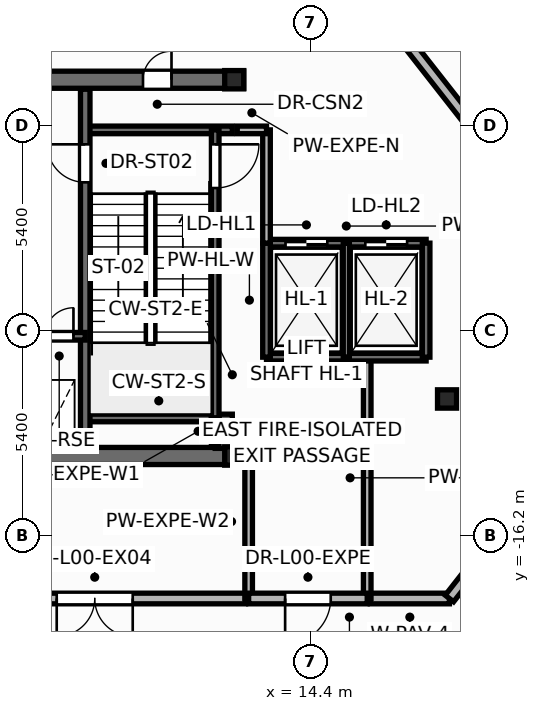
"""IFC4 building model, lengths in metres.
Left out: names, types, materials, properties, quantities, classifications, styles, units other than length and angle.
Written with IfcOpenShell. Run it as: python <this file> out.ifc"""

import sys

from ifc_helpers import new_model, si_unit, direction, frame, frame_2d, origin, origin_2d, place, context, subcontext, project, spatial, rectangle, i_section, extrude, element, fill, save


model = new_model("IFC4")
c1 = context("Model", 3, precision=1e-05, world=origin(), true_north=direction((0.0, 1.0)))
c2 = subcontext(c1, "Body", "Model", "MODEL_VIEW")
j1 = project(units=[si_unit("LENGTHUNIT", "METRE"), si_unit("PLANEANGLEUNIT", "RADIAN")], contexts=[c1])
p1 = place(None, origin())
s1 = spatial("IfcSite", under=j1, at=p1, CompositionType="ELEMENT")
p2 = place(p1, origin())
s2 = spatial("IfcBuilding", under=s1, at=p2, CompositionType="ELEMENT")
p3 = place(p2, origin())
s3 = spatial("IfcBuildingStorey", under=s2, at=p3, CompositionType="ELEMENT", Elevation=0.0)
for number, where, z_axis, x_axis in (
    (1, (12.4, -14.1, 0.0), (0.0, 0.0, 1.0), (1.0, 0.0, 0.0)),
    (2, (12.4, -4.2, 0.0), (0.0, 0.0, 1.0), (1.0, 0.0, 0.0)),
    (3, (18.0, -12.6, 0.0), (0.0, 0.0, 1.0), (1.0, 0.0, 0.0)),
):
    element("IfcColumn", number, at=place(p3, frame(where, z_axis=z_axis, x_axis=x_axis)), inside=s3, PredefinedType="COLUMN", context=c2, shape_type="SweptSolid", body=[
        extrude(i_section(OverallWidth=0.5, OverallDepth=0.482, WebThickness=0.04, FlangeThickness=0.045, at=origin_2d()), origin(), (0.0, 0.0, 1.0), 5.4),
    ])
p4 = place(p3, frame((12.7, -17.85, -0.015), z_axis=(0.0, 0.0, 1.0), x_axis=(-1.0, 0.0, 0.0)))
e4 = element("IfcWall", 4, at=p4, inside=s3, PredefinedType="STANDARD", context=c2, shape_type="SweptSolid", body=[
    extrude(rectangle(XDim=25.4, YDim=0.28, at=frame_2d((12.7, 0.0))), origin(), (0.0, 0.0, 1.0), 4.498),
])
p5 = place(p4, frame((2.97, 0.0, 0.015)))
e5 = element("IfcOpeningElement", 5, at=p5, cuts=e4, PredefinedType="OPENING", context=c2, shape_type="SweptSolid", body=[
    extrude(rectangle(XDim=2.006, YDim=2.304, at=frame_2d((1.0, 1.152))), frame((0.0, 0.15, 0.0), z_axis=(0.0, -1.0, 0.0), x_axis=(1.0, 0.0, 0.0)), (0.0, 0.0, 1.0), 0.3),
])
p6 = place(p3, frame((18.063, -17.85, -0.015), z_axis=(0.0, 0.0, 1.0), x_axis=(-1.0, 0.0, 0.0)))
e6 = element("IfcWall", 6, at=p6, inside=s3, PredefinedType="STANDARD", context=c2, shape_type="SweptSolid", body=[
    extrude(rectangle(XDim=2.083, YDim=0.28, at=frame_2d((1.042, 0.0))), origin(), (0.0, 0.0, 1.0), 5.135),
])
p7 = place(p3, frame((23.245, -11.24, -0.015), z_axis=(0.0, 0.0, 1.0), x_axis=(-0.616936653938, -0.787012811222, 0.0)))
e7 = element("IfcWall", 7, at=p7, inside=s3, PredefinedType="STANDARD", context=c2, shape_type="SweptSolid", body=[
    extrude(rectangle(XDim=8.399, YDim=0.28, at=frame_2d((4.199, 0.0))), origin(), (0.0, 0.0, 1.0), 5.135),
])
p8 = place(p7, frame((0.22, 0.0, 0.015)))
e8 = element("IfcOpeningElement", 8, at=p8, cuts=e7, PredefinedType="OPENING", context=c2, shape_type="SweptSolid", body=[
    extrude(rectangle(XDim=1.206, YDim=2.154, at=frame_2d((0.6, 1.077))), frame((0.0, 0.15, 0.0), z_axis=(0.0, -1.0, 0.0), x_axis=(1.0, 0.0, 0.0)), (0.0, 0.0, 1.0), 0.3),
])
p9 = place(p3, frame((5.583, 11.29, -0.015), z_axis=(0.0, 0.0, 1.0), x_axis=(0.616945483616, -0.787005889588, 0.0)))
e9 = element("IfcWall", 9, at=p9, inside=s3, PredefinedType="STANDARD", context=c2, shape_type="SweptSolid", body=[
    extrude(rectangle(XDim=28.627, YDim=0.28, at=frame_2d((14.314, 0.0))), origin(), (0.0, 0.0, 1.0), 3.91),
])
p10 = place(p9, frame((2.979, 0.0, 0.015)))
e10 = element("IfcOpeningElement", 10, at=p10, cuts=e9, PredefinedType="OPENING", context=c2, shape_type="SweptSolid", body=[
    extrude(rectangle(XDim=1.206, YDim=2.154, at=frame_2d((0.6, 1.077))), frame((0.0, 0.15, 0.0), z_axis=(0.0, -1.0, 0.0), x_axis=(1.0, 0.0, 0.0)), (0.0, 0.0, 1.0), 0.3),
])
p11 = place(p3, frame((-12.75, -14.1, 0.0), z_axis=(0.0, 0.0, 1.0), x_axis=(1.0, 0.0, 0.0)))
e11 = element("IfcWall", 11, at=p11, inside=s3, PredefinedType="SHEAR", context=c2, shape_type="SweptSolid", body=[
    extrude(rectangle(XDim=25.5, YDim=0.45, at=frame_2d((12.75, 0.0))), origin(), (0.0, 0.0, 1.0), 5.4),
])
p12 = place(p3, frame((-12.65, -4.2, 0.0), z_axis=(0.0, 0.0, 1.0), x_axis=(1.0, 0.0, 0.0)))
e12 = element("IfcWall", 12, at=p12, inside=s3, PredefinedType="SHEAR", context=c2, shape_type="SweptSolid", body=[
    extrude(rectangle(XDim=25.3, YDim=0.45, at=frame_2d((12.65, 0.0))), origin(), (0.0, 0.0, 1.0), 5.4),
])
p13 = place(p12, frame((1.85, 0.0, 0.0)))
e13 = element("IfcOpeningElement", 13, at=p13, cuts=e12, PredefinedType="OPENING", context=c2, shape_type="SweptSolid", body=[
    extrude(rectangle(XDim=0.756, YDim=2.054, at=frame_2d((0.375, 1.027))), frame((0.0, 0.235, 0.0), z_axis=(0.0, -1.0, 0.0), x_axis=(1.0, 0.0, 0.0)), (0.0, 0.0, 1.0), 0.47),
])
p14 = place(p12, frame((22.65, 0.0, 0.0)))
e14 = element("IfcOpeningElement", 14, at=p14, cuts=e12, PredefinedType="OPENING", context=c2, shape_type="SweptSolid", body=[
    extrude(rectangle(XDim=0.756, YDim=2.054, at=frame_2d((0.375, 1.027))), frame((0.0, 0.235, 0.0), z_axis=(0.0, -1.0, 0.0), x_axis=(1.0, 0.0, 0.0)), (0.0, 0.0, 1.0), 0.47),
])
p15 = place(p12, frame((5.85, 0.0, 0.0)))
e15 = element("IfcOpeningElement", 15, at=p15, cuts=e12, PredefinedType="OPENING", context=c2, shape_type="SweptSolid", body=[
    extrude(rectangle(XDim=1.006, YDim=2.104, at=frame_2d((0.5, 1.052))), frame((0.0, 0.235, 0.0), z_axis=(0.0, -1.0, 0.0), x_axis=(1.0, 0.0, 0.0)), (0.0, 0.0, 1.0), 0.47),
])
p16 = place(p12, frame((10.35, 0.0, 0.0)))
e16 = element("IfcOpeningElement", 16, at=p16, cuts=e12, PredefinedType="OPENING", context=c2, shape_type="SweptSolid", body=[
    extrude(rectangle(XDim=1.406, YDim=2.154, at=frame_2d((0.7, 1.077))), frame((0.0, 0.235, 0.0), z_axis=(0.0, -1.0, 0.0), x_axis=(1.0, 0.0, 0.0)), (0.0, 0.0, 1.0), 0.47),
])
p17 = place(p12, frame((18.45, 0.0, 0.0)))
e17 = element("IfcOpeningElement", 17, at=p17, cuts=e12, PredefinedType="OPENING", context=c2, shape_type="SweptSolid", body=[
    extrude(rectangle(XDim=1.006, YDim=2.104, at=frame_2d((0.5, 1.052))), frame((0.0, 0.235, 0.0), z_axis=(0.0, -1.0, 0.0), x_axis=(1.0, 0.0, 0.0)), (0.0, 0.0, 1.0), 0.47),
])
for number, where, z_axis, x_axis in (
    (18, (8.48, -5.52, 0.0), (0.0, 0.0, 1.0), (1.0, 0.0, 0.0)),
    (19, (8.48, -13.1, 0.0), (0.0, 0.0, 1.0), (1.0, 0.0, 0.0)),
):
    element("IfcWall", number, at=place(p3, frame(where, z_axis=z_axis, x_axis=x_axis)), inside=s3, PredefinedType="SOLIDWALL", context=c2, shape_type="SweptSolid", body=[
        extrude(rectangle(XDim=3.87, YDim=0.2, at=frame_2d((1.935, 0.0))), origin(), (0.0, 0.0, 1.0), 5.4),
    ])
p18 = place(p3, frame((11.9, -5.52, 0.0), z_axis=(0.0, 0.0, 1.0), x_axis=(0.0, -1.0, 0.0)))
e20 = element("IfcWall", 20, at=p18, inside=s3, PredefinedType="SOLIDWALL", context=c2, shape_type="SweptSolid", body=[
    extrude(rectangle(XDim=7.58, YDim=0.2, at=frame_2d((3.79, 0.0))), origin(), (0.0, 0.0, 1.0), 5.4),
])
p19 = place(p18, frame((0.38, 0.0, 0.0)))
e21 = element("IfcOpeningElement", 21, at=p19, cuts=e20, PredefinedType="OPENING", context=c2, shape_type="SweptSolid", body=[
    extrude(rectangle(XDim=1.156, YDim=2.154, at=frame_2d((0.575, 1.077))), frame((0.0, 0.11, 0.0), z_axis=(0.0, -1.0, 0.0), x_axis=(1.0, 0.0, 0.0)), (0.0, 0.0, 1.0), 0.22),
])
p20 = place(p3, frame((8.48, -13.85, 0.0), z_axis=(0.0, 0.0, 1.0), x_axis=(0.0, 1.0, 0.0)))
e22 = element("IfcWall", 22, at=p20, inside=s3, PredefinedType="SHEAR", context=c2, shape_type="SweptSolid", body=[
    extrude(rectangle(XDim=9.4, YDim=0.25, at=frame_2d((4.7, 0.0))), origin(), (0.0, 0.0, 1.0), 5.4),
])
p21 = place(p20, frame((6.95, 0.0, 0.0)))
e23 = element("IfcOpeningElement", 23, at=p21, cuts=e22, PredefinedType="OPENING", context=c2, shape_type="SweptSolid", body=[
    extrude(rectangle(XDim=1.006, YDim=2.104, at=frame_2d((0.5, 1.052))), frame((0.0, 0.135, 0.0), z_axis=(0.0, -1.0, 0.0), x_axis=(1.0, 0.0, 0.0)), (0.0, 0.0, 1.0), 0.27),
])
p22 = place(p3, frame((5.12, -10.95, 0.0), z_axis=(0.0, 0.0, 1.0), x_axis=(1.0, 0.0, 0.0)))
e24 = element("IfcWall", 24, at=p22, inside=s3, PredefinedType="SOLIDWALL", context=c2, shape_type="SweptSolid", body=[
    extrude(rectangle(XDim=3.36, YDim=0.2, at=frame_2d((1.68, 0.0))), origin(), (0.0, 0.0, 1.0), 5.4),
])
p23 = place(p22, frame((0.42, 0.0, 0.0)))
e25 = element("IfcOpeningElement", 25, at=p23, cuts=e24, PredefinedType="OPENING", context=c2, shape_type="SweptSolid", body=[
    extrude(rectangle(XDim=1.106, YDim=2.104, at=frame_2d((0.55, 1.052))), frame((0.0, 0.11, 0.0), z_axis=(0.0, -1.0, 0.0), x_axis=(1.0, 0.0, 0.0)), (0.0, 0.0, 1.0), 0.22),
])
p24 = place(p22, frame((2.3, 0.0, 0.0)))
e26 = element("IfcOpeningElement", 26, at=p24, cuts=e24, PredefinedType="OPENING", context=c2, shape_type="SweptSolid", body=[
    extrude(rectangle(XDim=0.756, YDim=2.054, at=frame_2d((0.375, 1.027))), frame((0.0, 0.11, 0.0), z_axis=(0.0, -1.0, 0.0), x_axis=(1.0, 0.0, 0.0)), (0.0, 0.0, 1.0), 0.22),
])
p25 = place(p3, frame((15.9, -17.85, 0.0), z_axis=(0.0, 0.0, 1.0), x_axis=(0.0, 1.0, 0.0)))
e27 = element("IfcWall", 27, at=p25, inside=s3, PredefinedType="SOLIDWALL", context=c2, shape_type="SweptSolid", body=[
    extrude(rectangle(XDim=6.35, YDim=0.2, at=frame_2d((3.175, 0.0))), origin(), (0.0, 0.0, 1.0), 5.12),
])
p26 = place(p3, frame((13.25, -11.5, 0.0), z_axis=(0.0, 0.0, 1.0), x_axis=(1.0, 0.0, 0.0)))
e28 = element("IfcWall", 28, at=p26, inside=s3, PredefinedType="SOLIDWALL", context=c2, shape_type="SweptSolid", body=[
    extrude(rectangle(XDim=4.2, YDim=0.2, at=frame_2d((2.1, 0.0))), origin(), (0.0, 0.0, 1.0), 5.4),
])
p27 = place(p3, frame((13.25, -8.5, 0.0), z_axis=(0.0, 0.0, 1.0), x_axis=(1.0, 0.0, 0.0)))
e29 = element("IfcWall", 29, at=p27, inside=s3, PredefinedType="SOLIDWALL", context=c2, shape_type="SweptSolid", body=[
    extrude(rectangle(XDim=4.2, YDim=0.2, at=frame_2d((2.1, 0.0))), origin(), (0.0, 0.0, 1.0), 5.4),
])
p28 = place(p27, frame((0.5, 0.0, 0.0)))
e30 = element("IfcOpeningElement", 30, at=p28, cuts=e29, PredefinedType="OPENING", context=c2, shape_type="SweptSolid", body=[
    extrude(rectangle(XDim=1.106, YDim=2.104, at=frame_2d((0.55, 1.052))), frame((0.0, 0.11, 0.0), z_axis=(0.0, -1.0, 0.0), x_axis=(1.0, 0.0, 0.0)), (0.0, 0.0, 1.0), 0.22),
])
p29 = place(p27, frame((2.6, 0.0, 0.0)))
e31 = element("IfcOpeningElement", 31, at=p29, cuts=e29, PredefinedType="OPENING", context=c2, shape_type="SweptSolid", body=[
    extrude(rectangle(XDim=1.106, YDim=2.104, at=frame_2d((0.55, 1.052))), frame((0.0, 0.11, 0.0), z_axis=(0.0, -1.0, 0.0), x_axis=(1.0, 0.0, 0.0)), (0.0, 0.0, 1.0), 0.22),
])
p30 = place(p3, frame((12.78, -17.85, 0.0), z_axis=(0.0, 0.0, 1.0), x_axis=(0.0, 1.0, 0.0)))
e32 = element("IfcWall", 32, at=p30, inside=s3, PredefinedType="SOLIDWALL", context=c2, shape_type="SweptSolid", body=[
    extrude(rectangle(XDim=4.05, YDim=0.2, at=frame_2d((2.025, 0.0))), origin(), (0.0, 0.0, 1.0), 5.12),
])
p31 = place(p3, frame((15.9, -17.85, 0.0), z_axis=(0.0, 0.0, 1.0), x_axis=(-1.0, 0.0, 0.0)))
e33 = element("IfcWall", 33, at=p31, inside=s3, PredefinedType="STANDARD", context=c2, shape_type="SweptSolid", body=[
    extrude(rectangle(XDim=3.12, YDim=0.28, at=frame_2d((1.56, 0.0))), origin(), (0.0, 0.0, 1.0), 5.12),
])
p32 = place(p31, frame((0.96, 0.0, 0.0)))
e34 = element("IfcOpeningElement", 34, at=p32, cuts=e33, PredefinedType="OPENING", context=c2, shape_type="SweptSolid", body=[
    extrude(rectangle(XDim=1.206, YDim=2.154, at=frame_2d((0.6, 1.077))), frame((0.0, 0.15, 0.0), z_axis=(0.0, -1.0, 0.0), x_axis=(1.0, 0.0, 0.0)), (0.0, 0.0, 1.0), 0.3),
])
for number, where, z_axis, x_axis in (
    (35, (13.25, -11.5, 0.0), (0.0, 0.0, 1.0), (0.0, 1.0, 0.0)),
    (36, (17.45, -11.5, 0.0), (0.0, 0.0, 1.0), (0.0, 1.0, 0.0)),
):
    element("IfcWall", number, at=place(p3, frame(where, z_axis=z_axis, x_axis=x_axis)), inside=s3, PredefinedType="SOLIDWALL", context=c2, shape_type="SweptSolid", body=[
        extrude(rectangle(XDim=3.0, YDim=0.2, at=frame_2d((1.5, 0.0))), origin(), (0.0, 0.0, 1.0), 5.4),
    ])
p33 = place(p3, frame((15.35, -11.5, 0.0), z_axis=(0.0, 0.0, 1.0), x_axis=(0.0, 1.0, 0.0)))
e37 = element("IfcWall", 37, at=p33, inside=s3, PredefinedType="PARTITIONING", context=c2, shape_type="SweptSolid", body=[
    extrude(rectangle(XDim=3.0, YDim=0.16, at=frame_2d((1.5, 0.0))), origin(), (0.0, 0.0, 1.0), 5.12),
])
p34 = place(p3, frame((13.25, -8.5, 0.0), z_axis=(0.0, 0.0, 1.0), x_axis=(0.0, 1.0, 0.0)))
e38 = element("IfcWall", 38, at=p34, inside=s3, PredefinedType="SOLIDWALL", context=c2, shape_type="SweptSolid", body=[
    extrude(rectangle(XDim=2.98, YDim=0.2, at=frame_2d((1.49, 0.0))), origin(), (0.0, 0.0, 1.0), 5.12),
])
p35 = place(p3, frame((11.9, -13.8, 0.0), z_axis=(0.0, 0.0, 1.0), x_axis=(1.0, 0.0, 0.0)))
e39 = element("IfcWall", 39, at=p35, inside=s3, PredefinedType="SOLIDWALL", context=c2, shape_type="SweptSolid", body=[
    extrude(rectangle(XDim=0.88, YDim=0.2, at=frame_2d((0.44, 0.0))), origin(), (0.0, 0.0, 1.0), 4.483),
])
p36 = place(p3, frame((12.48, -5.52, 0.0), z_axis=(0.0, 0.0, 1.0), x_axis=(1.0, 0.0, 0.0)))
e40 = element("IfcWall", 40, at=p36, inside=s3, PredefinedType="SOLIDWALL", context=c2, shape_type="SweptSolid", body=[
    extrude(rectangle(XDim=0.77, YDim=0.2, at=frame_2d((0.385, 0.0))), origin(), (0.0, 0.0, 1.0), 4.483),
])
p37 = place(p3, frame((11.9, -13.8, 0.0), z_axis=(0.0, 0.0, 1.0), x_axis=(0.0, 1.0, 0.0)))
e41 = element("IfcWall", 41, at=p37, inside=s3, PredefinedType="SOLIDWALL", context=c2, shape_type="SweptSolid", body=[
    extrude(rectangle(XDim=0.7, YDim=0.2, at=frame_2d((0.35, 0.0))), origin(), (0.0, 0.0, 1.0), 5.12),
])
p38 = place(p5, origin())
e42 = element("IfcDoor", 42, at=p38, inside=s3, OperationType="DOUBLE_DOOR_SINGLE_SWING", PredefinedType="DOOR", context=c2, shape_type="SweptSolid", body=[
    extrude(rectangle(XDim=2.0, YDim=2.3, at=frame_2d((1.0, 1.15))), frame((0.0, 0.025, 0.0), z_axis=(0.0, -1.0, 0.0), x_axis=(1.0, 0.0, 0.0)), (0.0, 0.0, 1.0), 0.05),
])
fill(e5, e42)
p39 = place(p21, origin())
e43 = element("IfcDoor", 43, at=p39, inside=s3, OperationType="SINGLE_SWING_RIGHT", PredefinedType="DOOR", context=c2, shape_type="SweptSolid", body=[
    extrude(rectangle(XDim=1.0, YDim=2.1, at=frame_2d((0.5, 1.05))), frame((0.0, 0.025, 0.0), z_axis=(0.0, -1.0, 0.0), x_axis=(1.0, 0.0, 0.0)), (0.0, 0.0, 1.0), 0.05),
])
fill(e23, e43)
p40 = place(p19, origin())
e44 = element("IfcDoor", 44, at=p40, inside=s3, OperationType="SINGLE_SWING_LEFT", PredefinedType="DOOR", context=c2, shape_type="SweptSolid", body=[
    extrude(rectangle(XDim=1.15, YDim=2.15, at=frame_2d((0.575, 1.075))), frame((0.0, 0.025, 0.0), z_axis=(0.0, -1.0, 0.0), x_axis=(1.0, 0.0, 0.0)), (0.0, 0.0, 1.0), 0.05),
])
fill(e21, e44)
p41 = place(p24, origin())
e45 = element("IfcDoor", 45, at=p41, inside=s3, OperationType="SINGLE_SWING_RIGHT", PredefinedType="DOOR", context=c2, shape_type="SweptSolid", body=[
    extrude(rectangle(XDim=0.75, YDim=2.05, at=frame_2d((0.375, 1.025))), frame((0.0, 0.025, 0.0), z_axis=(0.0, -1.0, 0.0), x_axis=(1.0, 0.0, 0.0)), (0.0, 0.0, 1.0), 0.05),
])
fill(e26, e45)
p42 = place(p14, origin())
e46 = element("IfcDoor", 46, at=p42, inside=s3, OperationType="SINGLE_SWING_RIGHT", PredefinedType="DOOR", context=c2, shape_type="SweptSolid", body=[
    extrude(rectangle(XDim=0.75, YDim=2.05, at=frame_2d((0.375, 1.025))), frame((0.0, 0.025, 0.0), z_axis=(0.0, -1.0, 0.0), x_axis=(1.0, 0.0, 0.0)), (0.0, 0.0, 1.0), 0.05),
])
fill(e14, e46)
p43 = place(p28, origin())
e47 = element("IfcDoor", 47, at=p43, inside=s3, OperationType="DOUBLE_DOOR_SLIDING", PredefinedType="DOOR", context=c2, shape_type="SweptSolid", body=[
    extrude(rectangle(XDim=1.1, YDim=2.1, at=frame_2d((0.55, 1.05))), frame((0.0, 0.025, 0.0), z_axis=(0.0, -1.0, 0.0), x_axis=(1.0, 0.0, 0.0)), (0.0, 0.0, 1.0), 0.05),
])
fill(e30, e47)
p44 = place(p29, origin())
e48 = element("IfcDoor", 48, at=p44, inside=s3, OperationType="DOUBLE_DOOR_SLIDING", PredefinedType="DOOR", context=c2, shape_type="SweptSolid", body=[
    extrude(rectangle(XDim=1.1, YDim=2.1, at=frame_2d((0.55, 1.05))), frame((0.0, 0.025, 0.0), z_axis=(0.0, -1.0, 0.0), x_axis=(1.0, 0.0, 0.0)), (0.0, 0.0, 1.0), 0.05),
])
fill(e31, e48)
p45 = place(p32, origin())
e49 = element("IfcDoor", 49, at=p45, inside=s3, OperationType="SINGLE_SWING_RIGHT", PredefinedType="DOOR", context=c2, shape_type="SweptSolid", body=[
    extrude(rectangle(XDim=1.2, YDim=2.15, at=frame_2d((0.6, 1.075))), frame((0.0, 0.025, 0.0), z_axis=(0.0, -1.0, 0.0), x_axis=(1.0, 0.0, 0.0)), (0.0, 0.0, 1.0), 0.05),
])
fill(e34, e49)
save(model, sys.argv[1])
